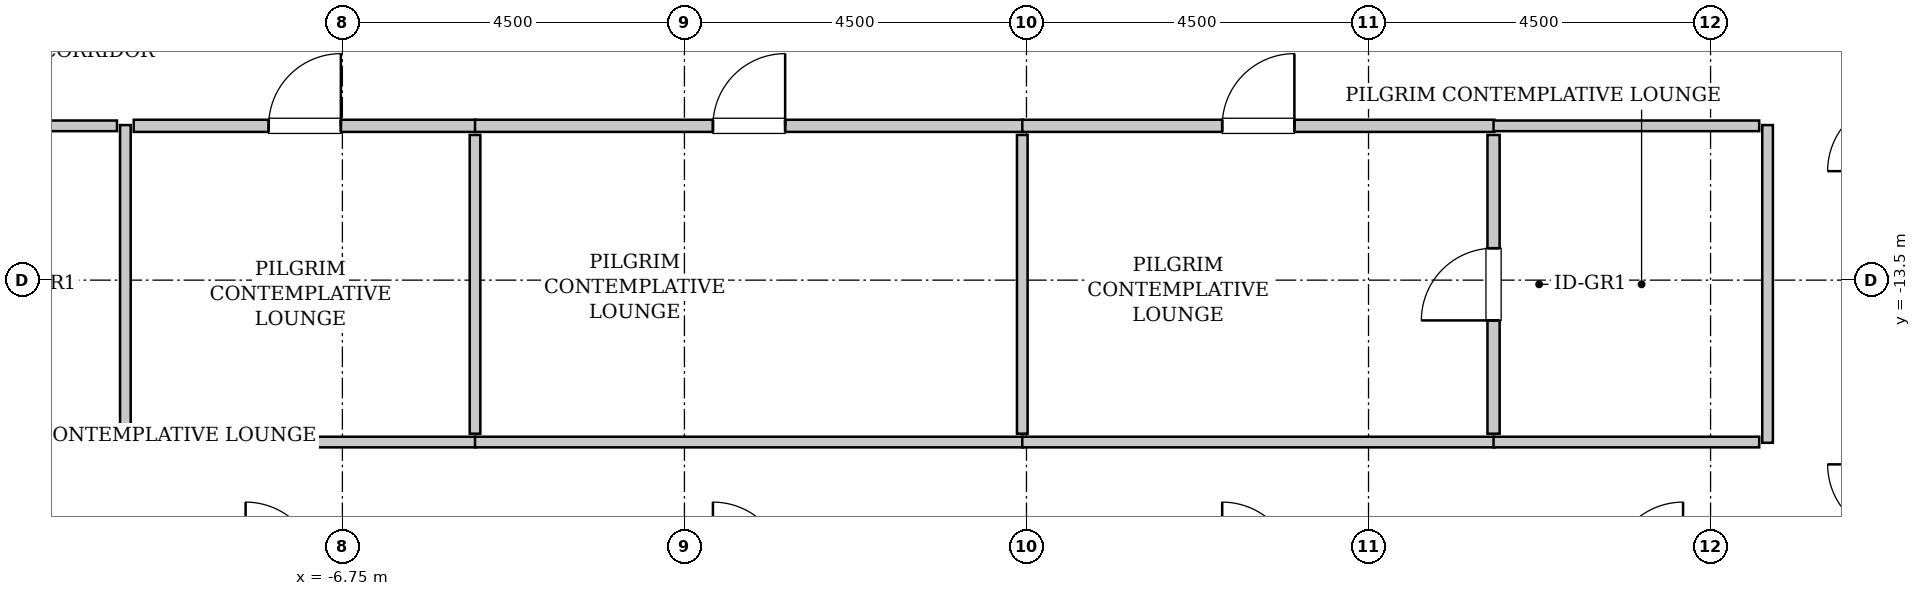
"""IFC4 building model, lengths in metres.
Left out: names, types, materials, properties, quantities, classifications, styles, units other than length and angle.
Written with IfcOpenShell. Run it as: python <this file> out.ifc"""

import sys

from ifc_helpers import new_model, si_unit, direction, frame, frame_2d, origin, place, context, subcontext, project, spatial, rectangle, extrude, source, transform, mapped, element, fill, save


model = new_model("IFC4")
c1 = context("Model", 3, precision=1e-05, world=origin(), true_north=direction((0.0, 1.0)))
c2 = subcontext(c1, "Body", "Model", "MODEL_VIEW")
j1 = project(units=[si_unit("LENGTHUNIT", "METRE"), si_unit("PLANEANGLEUNIT", "RADIAN")], contexts=[c1])
p1 = place(None, origin())
s1 = spatial("IfcSite", under=j1, at=p1, CompositionType="ELEMENT")
p2 = place(p1, origin())
s2 = spatial("IfcBuilding", under=s1, at=p2, CompositionType="ELEMENT")
p3 = place(p2, frame((0.0, 0.0, 237.0)))
s3 = spatial("IfcBuildingStorey", under=s2, at=p3, CompositionType="ELEMENT", Elevation=237.0)
m1 = source(origin(), c2, "Body", "SweptSolid", [
    extrude(rectangle(XDim=4.18, YDim=0.14, at=frame_2d((2.09, 0.0))), origin(), (0.0, 0.0, 1.0), 3.535),
])
p4 = place(p3, frame((-9.605, -15.64, 0.0), z_axis=(0.0, 0.0, 1.0), x_axis=(0.0, 1.0, 0.0)))
e1 = element("IfcWall", 1, at=p4, inside=s3, PredefinedType="PARTITIONING", context=c2, shape_type="MappedRepresentation", body=[
    mapped(m1, transform((0.0, 0.0, 0.0), x_axis=(1.0, 0.0, 0.0), y_axis=(0.0, 1.0, 0.0), z_axis=(0.0, 0.0, 1.0), scale=1.0)),
])
m2 = source(origin(), c2, "Body", "SweptSolid", [
    extrude(rectangle(XDim=2.165, YDim=0.14, at=frame_2d((1.083, 0.0))), origin(), (0.0, 0.0, 1.0), 3.535),
])
for number, where, z_axis, x_axis in (
    (2, (-11.88, -11.47, 0.0), (0.0, 0.0, 1.0), (1.0, 0.0, 0.0)),
    (3, (-11.88, -15.63, 0.0), (0.0, 0.0, 1.0), (1.0, 0.0, 0.0)),
):
    element("IfcWall", number, at=place(p3, frame(where, z_axis=z_axis, x_axis=x_axis)), inside=s3, PredefinedType="PARTITIONING", context=c2, shape_type="MappedRepresentation", body=[
        mapped(m2, transform((0.0, 0.0, 0.0), x_axis=(1.0, 0.0, 0.0), y_axis=(0.0, 1.0, 0.0), z_axis=(0.0, 0.0, 1.0), scale=1.0)),
    ])
m3 = source(origin(), c2, "Body", "SweptSolid", [
    extrude(rectangle(XDim=4.5, YDim=0.16, at=frame_2d((2.25, 0.0))), origin(), (0.0, 0.0, 1.0), 3.535),
])
p5 = place(p3, frame((-9.495, -11.47, 0.0), z_axis=(0.0, 0.0, 1.0), x_axis=(1.0, 0.0, 0.0)))
e4 = element("IfcWall", 4, at=p5, inside=s3, PredefinedType="PARTITIONING", context=c2, shape_type="MappedRepresentation", body=[
    mapped(m3, transform((0.0, 0.0, 0.0), x_axis=(1.0, 0.0, 0.0), y_axis=(0.0, 1.0, 0.0), z_axis=(0.0, 0.0, 1.0), scale=1.0)),
])
p6 = place(p5, frame((1.775, 0.0, 0.0)))
e5 = element("IfcOpeningElement", 5, at=p6, cuts=e4, PredefinedType="OPENING", context=c2, shape_type="SweptSolid", body=[
    extrude(rectangle(XDim=0.95, YDim=2.1, at=frame_2d((0.475, 1.05))), frame((0.0, 0.09, 0.0), z_axis=(0.0, -1.0, 0.0), x_axis=(1.0, 0.0, 0.0)), (0.0, 0.0, 1.0), 0.18),
])
m4 = source(origin(), c2, "Body", "SweptSolid", [
    extrude(rectangle(XDim=4.5, YDim=0.14, at=frame_2d((2.25, 0.0))), origin(), (0.0, 0.0, 1.0), 3.535),
])
p7 = place(p3, frame((-9.495, -15.63, 0.0), z_axis=(0.0, 0.0, 1.0), x_axis=(1.0, 0.0, 0.0)))
e6 = element("IfcWall", 6, at=p7, inside=s3, PredefinedType="PARTITIONING", context=c2, shape_type="MappedRepresentation", body=[
    mapped(m4, transform((0.0, 0.0, 0.0), x_axis=(1.0, 0.0, 0.0), y_axis=(0.0, 1.0, 0.0), z_axis=(0.0, 0.0, 1.0), scale=1.0)),
])
m5 = source(origin(), c2, "Body", "SweptSolid", [
    extrude(rectangle(XDim=3.93, YDim=0.14, at=frame_2d((1.965, 0.0))), origin(), (0.0, 0.0, 1.0), 3.535),
])
p8 = place(p3, frame((-5.005, -15.52, 0.0), z_axis=(0.0, 0.0, 1.0), x_axis=(0.0, 1.0, 0.0)))
e7 = element("IfcWall", 7, at=p8, inside=s3, PredefinedType="PARTITIONING", context=c2, shape_type="MappedRepresentation", body=[
    mapped(m5, transform((0.0, 0.0, 0.0), x_axis=(1.0, 0.0, 0.0), y_axis=(0.0, 1.0, 0.0), z_axis=(0.0, 0.0, 1.0), scale=1.0)),
])
m6 = source(origin(), c2, "Body", "SweptSolid", [
    extrude(rectangle(XDim=7.21, YDim=0.16, at=frame_2d((3.605, 0.0))), origin(), (0.0, 0.0, 1.0), 3.535),
])
p9 = place(p3, frame((-5.005, -11.47, 0.0), z_axis=(0.0, 0.0, 1.0), x_axis=(1.0, 0.0, 0.0)))
e8 = element("IfcWall", 8, at=p9, inside=s3, PredefinedType="PARTITIONING", context=c2, shape_type="MappedRepresentation", body=[
    mapped(m6, transform((0.0, 0.0, 0.0), x_axis=(1.0, 0.0, 0.0), y_axis=(0.0, 1.0, 0.0), z_axis=(0.0, 0.0, 1.0), scale=1.0)),
])
p10 = place(p9, frame((3.13, 0.0, 0.0)))
e9 = element("IfcOpeningElement", 9, at=p10, cuts=e8, PredefinedType="OPENING", context=c2, shape_type="SweptSolid", body=[
    extrude(rectangle(XDim=0.95, YDim=2.1, at=frame_2d((0.475, 1.05))), frame((0.0, 0.09, 0.0), z_axis=(0.0, -1.0, 0.0), x_axis=(1.0, 0.0, 0.0)), (0.0, 0.0, 1.0), 0.18),
])
m7 = source(origin(), c2, "Body", "SweptSolid", [
    extrude(rectangle(XDim=7.21, YDim=0.14, at=frame_2d((3.605, 0.0))), origin(), (0.0, 0.0, 1.0), 3.535),
])
p11 = place(p3, frame((-5.005, -15.63, 0.0), z_axis=(0.0, 0.0, 1.0), x_axis=(1.0, 0.0, 0.0)))
e10 = element("IfcWall", 10, at=p11, inside=s3, PredefinedType="PARTITIONING", context=c2, shape_type="MappedRepresentation", body=[
    mapped(m7, transform((0.0, 0.0, 0.0), x_axis=(1.0, 0.0, 0.0), y_axis=(0.0, 1.0, 0.0), z_axis=(0.0, 0.0, 1.0), scale=1.0)),
])
p12 = place(p3, frame((2.195, -15.52, 0.0), z_axis=(0.0, 0.0, 1.0), x_axis=(0.0, 1.0, 0.0)))
e11 = element("IfcWall", 11, at=p12, inside=s3, PredefinedType="PARTITIONING", context=c2, shape_type="MappedRepresentation", body=[
    mapped(m5, transform((0.0, 0.0, 0.0), x_axis=(1.0, 0.0, 0.0), y_axis=(0.0, 1.0, 0.0), z_axis=(0.0, 0.0, 1.0), scale=1.0)),
])
m8 = source(origin(), c2, "Body", "SweptSolid", [
    extrude(rectangle(XDim=6.21, YDim=0.16, at=frame_2d((3.105, 0.0))), origin(), (0.0, 0.0, 1.0), 3.535),
])
p13 = place(p3, frame((2.195, -11.47, 0.0), z_axis=(0.0, 0.0, 1.0), x_axis=(1.0, 0.0, 0.0)))
e12 = element("IfcWall", 12, at=p13, inside=s3, PredefinedType="PARTITIONING", context=c2, shape_type="MappedRepresentation", body=[
    mapped(m8, transform((0.0, 0.0, 0.0), x_axis=(1.0, 0.0, 0.0), y_axis=(0.0, 1.0, 0.0), z_axis=(0.0, 0.0, 1.0), scale=1.0)),
])
p14 = place(p13, frame((2.63, 0.0, 0.0)))
e13 = element("IfcOpeningElement", 13, at=p14, cuts=e12, PredefinedType="OPENING", context=c2, shape_type="SweptSolid", body=[
    extrude(rectangle(XDim=0.95, YDim=2.1, at=frame_2d((0.475, 1.05))), frame((0.0, 0.09, 0.0), z_axis=(0.0, -1.0, 0.0), x_axis=(1.0, 0.0, 0.0)), (0.0, 0.0, 1.0), 0.18),
])
m9 = source(origin(), c2, "Body", "SweptSolid", [
    extrude(rectangle(XDim=6.21, YDim=0.14, at=frame_2d((3.105, 0.0))), origin(), (0.0, 0.0, 1.0), 3.535),
])
p15 = place(p3, frame((2.195, -15.63, 0.0), z_axis=(0.0, 0.0, 1.0), x_axis=(1.0, 0.0, 0.0)))
e14 = element("IfcWall", 14, at=p15, inside=s3, PredefinedType="PARTITIONING", context=c2, shape_type="MappedRepresentation", body=[
    mapped(m9, transform((0.0, 0.0, 0.0), x_axis=(1.0, 0.0, 0.0), y_axis=(0.0, 1.0, 0.0), z_axis=(0.0, 0.0, 1.0), scale=1.0)),
])
m10 = source(origin(), c2, "Body", "SweptSolid", [
    extrude(rectangle(XDim=3.93, YDim=0.16, at=frame_2d((1.965, 0.0))), origin(), (0.0, 0.0, 1.0), 3.535),
])
p16 = place(p3, frame((8.395, -15.52, 0.0), z_axis=(0.0, 0.0, 1.0), x_axis=(0.0, 1.0, 0.0)))
e15 = element("IfcWall", 15, at=p16, inside=s3, PredefinedType="PARTITIONING", context=c2, shape_type="MappedRepresentation", body=[
    mapped(m10, transform((0.0, 0.0, 0.0), x_axis=(1.0, 0.0, 0.0), y_axis=(0.0, 1.0, 0.0), z_axis=(0.0, 0.0, 1.0), scale=1.0)),
])
p17 = place(p16, frame((1.49, 0.0, 0.0)))
e16 = element("IfcOpeningElement", 16, at=p17, cuts=e15, PredefinedType="OPENING", context=c2, shape_type="SweptSolid", body=[
    extrude(rectangle(XDim=0.95, YDim=2.1, at=frame_2d((0.475, 1.05))), frame((0.0, 0.09, 0.0), z_axis=(0.0, -1.0, 0.0), x_axis=(1.0, 0.0, 0.0)), (0.0, 0.0, 1.0), 0.18),
])
p18 = place(p3, frame((12.0, -15.64, 0.0), z_axis=(0.0, 0.0, 1.0), x_axis=(0.0, 1.0, 0.0)))
e17 = element("IfcWall", 17, at=p18, inside=s3, PredefinedType="PARTITIONING", context=c2, shape_type="MappedRepresentation", body=[
    mapped(m1, transform((0.0, 0.0, 0.0), x_axis=(1.0, 0.0, 0.0), y_axis=(0.0, 1.0, 0.0), z_axis=(0.0, 0.0, 1.0), scale=1.0)),
])
m11 = source(origin(), c2, "Body", "SweptSolid", [
    extrude(rectangle(XDim=3.495, YDim=0.14, at=frame_2d((1.748, 0.0))), origin(), (0.0, 0.0, 1.0), 3.535),
])
for number, where, z_axis, x_axis in (
    (18, (8.395, -11.47, 0.0), (0.0, 0.0, 1.0), (1.0, 0.0, 0.0)),
    (19, (8.395, -15.63, 0.0), (0.0, 0.0, 1.0), (1.0, 0.0, 0.0)),
):
    element("IfcWall", number, at=place(p3, frame(where, z_axis=z_axis, x_axis=x_axis)), inside=s3, PredefinedType="PARTITIONING", context=c2, shape_type="MappedRepresentation", body=[
        mapped(m11, transform((0.0, 0.0, 0.0), x_axis=(1.0, 0.0, 0.0), y_axis=(0.0, 1.0, 0.0), z_axis=(0.0, 0.0, 1.0), scale=1.0)),
    ])
m12 = source(origin(), c2, "Body", "SweptSolid", [
    extrude(rectangle(XDim=0.95, YDim=2.1, at=frame_2d((0.475, 1.05))), frame((0.0, 0.025, 0.0), z_axis=(0.0, -1.0, 0.0), x_axis=(1.0, 0.0, 0.0)), (0.0, 0.0, 1.0), 0.05),
])
p19 = place(p6, origin())
e20 = element("IfcDoor", 20, at=p19, inside=s3, OperationType="SINGLE_SWING_RIGHT", PredefinedType="DOOR", context=c2, shape_type="MappedRepresentation", body=[
    mapped(m12, transform((0.0, 0.0, 0.0), x_axis=(1.0, 0.0, 0.0), y_axis=(0.0, 1.0, 0.0), z_axis=(0.0, 0.0, 1.0), scale=1.0)),
])
fill(e5, e20)
p20 = place(p10, origin())
e21 = element("IfcDoor", 21, at=p20, inside=s3, OperationType="SINGLE_SWING_RIGHT", PredefinedType="DOOR", context=c2, shape_type="MappedRepresentation", body=[
    mapped(m12, transform((0.0, 0.0, 0.0), x_axis=(1.0, 0.0, 0.0), y_axis=(0.0, 1.0, 0.0), z_axis=(0.0, 0.0, 1.0), scale=1.0)),
])
fill(e9, e21)
p21 = place(p14, origin())
e22 = element("IfcDoor", 22, at=p21, inside=s3, OperationType="SINGLE_SWING_RIGHT", PredefinedType="DOOR", context=c2, shape_type="MappedRepresentation", body=[
    mapped(m12, transform((0.0, 0.0, 0.0), x_axis=(1.0, 0.0, 0.0), y_axis=(0.0, 1.0, 0.0), z_axis=(0.0, 0.0, 1.0), scale=1.0)),
])
fill(e13, e22)
p22 = place(p17, origin())
e23 = element("IfcDoor", 23, at=p22, inside=s3, OperationType="SINGLE_SWING_LEFT", PredefinedType="DOOR", context=c2, shape_type="MappedRepresentation", body=[
    mapped(m12, transform((0.0, 0.0, 0.0), x_axis=(1.0, 0.0, 0.0), y_axis=(0.0, 1.0, 0.0), z_axis=(0.0, 0.0, 1.0), scale=1.0)),
])
fill(e16, e23)
save(model, sys.argv[1])
